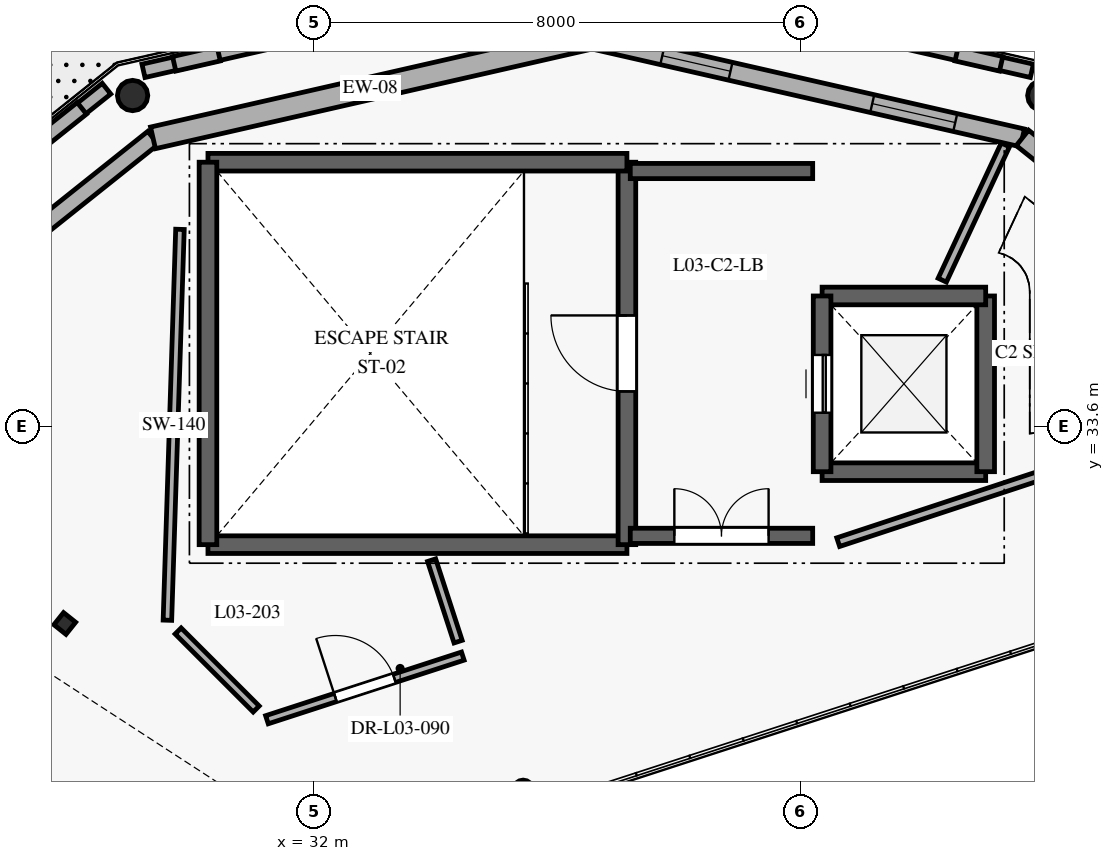
"""IFC4 building model, lengths in metres.
Left out: names, types, materials, properties, quantities, classifications, styles, units other than length and angle.
Written with IfcOpenShell. Run it as: python <this file> out.ifc"""

import sys

from ifc_helpers import new_model, si_unit, direction, frame, frame_2d, origin, origin_2d, place, context, subcontext, project, spatial, rectangle, circle, hollow_circle, i_section, extrude, element, fill, save


model = new_model("IFC4")
c1 = context("Model", 3, precision=1e-05, world=origin(), true_north=direction((0.0, 1.0)))
c2 = subcontext(c1, "Body", "Model", "MODEL_VIEW")
j1 = project(units=[si_unit("LENGTHUNIT", "METRE"), si_unit("PLANEANGLEUNIT", "RADIAN")], contexts=[c1])
p1 = place(None, origin())
s1 = spatial("IfcSite", under=j1, at=p1, CompositionType="ELEMENT")
p2 = place(p1, origin())
s2 = spatial("IfcBuilding", under=s1, at=p2, CompositionType="ELEMENT")
p3 = place(p2, frame((0.0, 0.0, 12.6)))
s3 = spatial("IfcBuildingStorey", under=s2, at=p3, CompositionType="ELEMENT", Elevation=12.6)
p4 = place(p3, frame((35.439, 27.621, 0.0), z_axis=(0.0, 0.0, 1.0), x_axis=(0.951056516295, 0.309016994375, 0.0)))
e1 = element("IfcColumn", 1, at=p4, inside=s3, PredefinedType="COLUMN", context=c2, shape_type="SweptSolid", body=[
    extrude(hollow_circle(Radius=0.162, WallThickness=0.016, at=origin_2d()), origin(), (0.0, 0.0, 1.0), 4.2),
])
for number, where, z_axis, x_axis in (
    (2, (43.985, 39.042, 0.0), (0.0, 0.0, 1.0), (-0.901, 0.434, 0.0)),
    (3, (29.015, 39.042, 0.0), (0.0, 0.0, 1.0), (-0.901, -0.434, 0.0)),
):
    element("IfcColumn", number, at=place(p3, frame(where, z_axis=z_axis, x_axis=x_axis)), inside=s3, PredefinedType="COLUMN", context=c2, shape_type="SweptSolid", body=[
        extrude(circle(Radius=0.25, at=origin_2d()), origin(), (0.0, 0.0, 1.0), 4.2),
    ])
p5 = place(p3, frame((27.9, 30.358, 0.0), z_axis=(0.0, 0.0, 1.0), x_axis=(-0.623470308046, -0.781847027868, 0.0)))
e4 = element("IfcColumn", 4, at=p5, inside=s3, PredefinedType="COLUMN", context=c2, shape_type="SweptSolid", body=[
    extrude(i_section(OverallWidth=0.255, OverallDepth=0.254, WebThickness=0.009, FlangeThickness=0.014, FilletRadius=0.013, at=origin_2d()), origin(), (0.0, 0.0, 1.0), 4.2),
])
p6 = place(p3, frame((23.618, 33.773, 0.0), z_axis=(0.0, 0.0, 1.0), x_axis=(0.781819636461, 0.623504655992, 0.0)))
e5 = element("IfcWall", 5, at=p6, inside=s3, PredefinedType="SOLIDWALL", context=c2, shape_type="SweptSolid", body=[
    extrude(rectangle(XDim=7.333, YDim=0.275, at=frame_2d((3.667, 0.0))), origin(), (0.0, 0.0, 1.0), 3.94),
])
p7 = place(p6, frame((0.35, 0.0, 0.85)))
e6 = element("IfcOpeningElement", 6, at=p7, cuts=e5, PredefinedType="OPENING", context=c2, shape_type="SweptSolid", body=[
    extrude(rectangle(XDim=0.85, YDim=1.4, at=frame_2d((0.425, 0.7))), frame((0.0, 0.147, 0.0), z_axis=(0.0, -1.0, 0.0), x_axis=(1.0, 0.0, 0.0)), (0.0, 0.0, 1.0), 0.295),
])
p8 = place(p6, frame((4.016, 0.0, 0.85)))
e7 = element("IfcOpeningElement", 7, at=p8, cuts=e5, PredefinedType="OPENING", context=c2, shape_type="SweptSolid", body=[
    extrude(rectangle(XDim=0.85, YDim=1.4, at=frame_2d((0.425, 0.7))), frame((0.0, 0.147, 0.0), z_axis=(0.0, -1.0, 0.0), x_axis=(1.0, 0.0, 0.0)), (0.0, 0.0, 1.0), 0.295),
])
p9 = place(p3, frame((29.351, 38.345, 0.0), z_axis=(0.0, 0.0, 1.0), x_axis=(0.974932633187, 0.222500248868, 0.0)))
e8 = element("IfcWall", 8, at=p9, inside=s3, PredefinedType="SOLIDWALL", context=c2, shape_type="SweptSolid", body=[
    extrude(rectangle(XDim=7.333, YDim=0.365, at=frame_2d((3.667, 0.0))), origin(), (0.0, 0.0, 1.0), 3.94),
])
p10 = place(p3, frame((36.5, 39.977, 0.0), z_axis=(0.0, 0.0, 1.0), x_axis=(0.974932633187, -0.222500248868, 0.0)))
e9 = element("IfcWall", 9, at=p10, inside=s3, PredefinedType="SOLIDWALL", context=c2, shape_type="SweptSolid", body=[
    extrude(rectangle(XDim=7.333, YDim=0.3, at=frame_2d((3.667, 0.0))), origin(), (0.0, 0.0, 1.0), 3.94),
])
p11 = place(p10, frame((1.258, 0.0, 0.85)))
e10 = element("IfcOpeningElement", 10, at=p11, cuts=e9, PredefinedType="OPENING", context=c2, shape_type="SweptSolid", body=[
    extrude(rectangle(XDim=1.15, YDim=1.5, at=frame_2d((0.575, 0.75))), frame((0.0, 0.16, 0.0), z_axis=(0.0, -1.0, 0.0), x_axis=(1.0, 0.0, 0.0)), (0.0, 0.0, 1.0), 0.32),
])
p12 = place(p10, frame((4.8, 0.0, 0.85)))
e11 = element("IfcOpeningElement", 11, at=p12, cuts=e9, PredefinedType="OPENING", context=c2, shape_type="SweptSolid", body=[
    extrude(rectangle(XDim=1.4, YDim=1.5, at=frame_2d((0.7, 0.75))), frame((0.0, 0.16, 0.0), z_axis=(0.0, -1.0, 0.0), x_axis=(1.0, 0.0, 0.0)), (0.0, 0.0, 1.0), 0.32),
])
p13 = place(p3, frame((43.649, 38.345, 0.0), z_axis=(0.0, 0.0, 1.0), x_axis=(0.781819636461, -0.623504655992, 0.0)))
e12 = element("IfcWall", 12, at=p13, inside=s3, PredefinedType="SOLIDWALL", context=c2, shape_type="SweptSolid", body=[
    extrude(rectangle(XDim=7.333, YDim=0.325, at=frame_2d((3.667, 0.0))), origin(), (0.0, 0.0, 1.0), 3.94),
])
p14 = place(p13, frame((1.008, 0.0, 0.85)))
e13 = element("IfcOpeningElement", 13, at=p14, cuts=e12, PredefinedType="OPENING", context=c2, shape_type="SweptSolid", body=[
    extrude(rectangle(XDim=1.65, YDim=1.5, at=frame_2d((0.825, 0.75))), frame((0.0, 0.172, 0.0), z_axis=(0.0, -1.0, 0.0), x_axis=(1.0, 0.0, 0.0)), (0.0, 0.0, 1.0), 0.345),
])
p15 = place(p13, frame((4.55, 0.0, 0.85)))
e14 = element("IfcOpeningElement", 14, at=p15, cuts=e12, PredefinedType="OPENING", context=c2, shape_type="SweptSolid", body=[
    extrude(rectangle(XDim=1.9, YDim=1.5, at=frame_2d((0.95, 0.75))), frame((0.0, 0.172, 0.0), z_axis=(0.0, -1.0, 0.0), x_axis=(1.0, 0.0, 0.0)), (0.0, 0.0, 1.0), 0.345),
])
p16 = place(p3, frame((43.805, 39.448, 0.0), z_axis=(0.0, 0.0, 1.0), x_axis=(-0.974925038555, 0.222533523763, 0.0)))
e15 = element("IfcWall", 15, at=p16, inside=s3, PredefinedType="ELEMENTEDWALL", context=c2, shape_type="SweptSolid", body=[
    extrude(rectangle(XDim=7.146, YDim=0.225, at=frame_2d((3.573, 0.0))), origin(), (0.0, 0.0, 1.0), 1.09),
])
p17 = place(p3, frame((43.3, 39.563, 1.09), z_axis=(0.0, 0.0, 1.0), x_axis=(-0.974898895053, 0.222648028119, 0.0)))
e16 = element("IfcWall", 16, at=p17, inside=s3, PredefinedType="ELEMENTEDWALL", context=c2, shape_type="SweptSolid", body=[
    extrude(rectangle(XDim=0.75, YDim=0.245, at=frame_2d((0.375, 0.0))), origin(), (0.0, 0.0, 1.0), 2.85),
])
p18 = place(p3, frame((36.162, 41.038, 0.0), z_axis=(0.0, 0.0, 1.0), x_axis=(-0.97493180424, -0.222503881046, 0.0)))
e17 = element("IfcWall", 17, at=p18, inside=s3, PredefinedType="ELEMENTEDWALL", context=c2, shape_type="SweptSolid", body=[
    extrude(rectangle(XDim=7.147, YDim=0.225, at=frame_2d((3.574, 0.0))), origin(), (0.0, 0.0, 1.0), 1.09),
])
p19 = place(p3, frame((30.431, 39.73, 1.09), z_axis=(0.0, 0.0, 1.0), x_axis=(-0.974969505796, -0.222338621856, 0.0)))
e18 = element("IfcWall", 18, at=p19, inside=s3, PredefinedType="ELEMENTEDWALL", context=c2, shape_type="SweptSolid", body=[
    extrude(rectangle(XDim=0.75, YDim=0.245, at=frame_2d((0.375, 0.0))), origin(), (0.0, 0.0, 1.0), 2.85),
])
p20 = place(p3, frame((28.586, 39.155, 0.0), z_axis=(0.0, 0.0, 1.0), x_axis=(-0.781840989125, -0.623477880702, 0.0)))
e19 = element("IfcWall", 19, at=p20, inside=s3, PredefinedType="ELEMENTEDWALL", context=c2, shape_type="SweptSolid", body=[
    extrude(rectangle(XDim=7.147, YDim=0.225, at=frame_2d((3.573, 0.0))), origin(), (0.0, 0.0, 1.0), 1.09),
])
p21 = place(p3, frame((28.181, 38.832, 1.09), z_axis=(0.0, 0.0, 1.0), x_axis=(-0.781757082545, -0.623583084994, 0.0)))
e20 = element("IfcWall", 20, at=p21, inside=s3, PredefinedType="ELEMENTEDWALL", context=c2, shape_type="SweptSolid", body=[
    extrude(rectangle(XDim=0.75, YDim=0.245, at=frame_2d((0.375, 0.0))), origin(), (0.0, 0.0, 1.0), 2.85),
])
p22 = place(p3, frame((30.255, 31.655, 0.0), z_axis=(0.0, 0.0, 1.0), x_axis=(1.0, 0.0, 0.0)))
e21 = element("IfcWall", 21, at=p22, inside=s3, PredefinedType="SHEAR", context=c2, shape_type="SweptSolid", body=[
    extrude(rectangle(XDim=6.89, YDim=0.29, at=frame_2d((3.445, 0.0))), origin(), (0.0, 0.0, 1.0), 3.95),
])
p23 = place(p3, frame((37.145, 31.655, 0.0), z_axis=(0.0, 0.0, 1.0), x_axis=(0.0, 1.0, 0.0)))
e22 = element("IfcWall", 22, at=p23, inside=s3, PredefinedType="SHEAR", context=c2, shape_type="SweptSolid", body=[
    extrude(rectangle(XDim=6.29, YDim=0.29, at=frame_2d((3.145, 0.0))), origin(), (0.0, 0.0, 1.0), 3.95),
])
p24 = place(p23, frame((2.52, 0.0, 0.0)))
e23 = element("IfcOpeningElement", 23, at=p24, cuts=e22, PredefinedType="OPENING", context=c2, shape_type="SweptSolid", body=[
    extrude(rectangle(XDim=1.25, YDim=2.1, at=frame_2d((0.625, 1.05))), frame((0.0, 0.155, 0.0), z_axis=(0.0, -1.0, 0.0), x_axis=(1.0, 0.0, 0.0)), (0.0, 0.0, 1.0), 0.31),
])
p25 = place(p3, frame((37.145, 37.945, 0.0), z_axis=(0.0, 0.0, 1.0), x_axis=(-1.0, 0.0, 0.0)))
e24 = element("IfcWall", 24, at=p25, inside=s3, PredefinedType="SHEAR", context=c2, shape_type="SweptSolid", body=[
    extrude(rectangle(XDim=6.89, YDim=0.29, at=frame_2d((3.445, 0.0))), origin(), (0.0, 0.0, 1.0), 3.95),
])
p26 = place(p3, frame((30.255, 37.945, 0.0), z_axis=(0.0, 0.0, 1.0), x_axis=(0.0, -1.0, 0.0)))
e25 = element("IfcWall", 25, at=p26, inside=s3, PredefinedType="SHEAR", context=c2, shape_type="SweptSolid", body=[
    extrude(rectangle(XDim=6.29, YDim=0.29, at=frame_2d((3.145, 0.0))), origin(), (0.0, 0.0, 1.0), 3.95),
])
p27 = place(p3, frame((40.355, 32.855, 0.0), z_axis=(0.0, 0.0, 1.0), x_axis=(1.0, 0.0, 0.0)))
e26 = element("IfcWall", 26, at=p27, inside=s3, PredefinedType="SHEAR", context=c2, shape_type="SweptSolid", body=[
    extrude(rectangle(XDim=2.69, YDim=0.29, at=frame_2d((1.345, 0.0))), origin(), (0.0, 0.0, 1.0), 3.95),
])
p28 = place(p3, frame((43.045, 32.855, 0.0), z_axis=(0.0, 0.0, 1.0), x_axis=(0.0, 1.0, 0.0)))
e27 = element("IfcWall", 27, at=p28, inside=s3, PredefinedType="SHEAR", context=c2, shape_type="SweptSolid", body=[
    extrude(rectangle(XDim=2.89, YDim=0.29, at=frame_2d((1.445, 0.0))), origin(), (0.0, 0.0, 1.0), 3.95),
])
p29 = place(p3, frame((43.045, 35.745, 0.0), z_axis=(0.0, 0.0, 1.0), x_axis=(-1.0, 0.0, 0.0)))
e28 = element("IfcWall", 28, at=p29, inside=s3, PredefinedType="SHEAR", context=c2, shape_type="SweptSolid", body=[
    extrude(rectangle(XDim=2.69, YDim=0.29, at=frame_2d((1.345, 0.0))), origin(), (0.0, 0.0, 1.0), 3.95),
])
p30 = place(p3, frame((40.355, 35.745, 0.0), z_axis=(0.0, 0.0, 1.0), x_axis=(0.0, -1.0, 0.0)))
e29 = element("IfcWall", 29, at=p30, inside=s3, PredefinedType="SHEAR", context=c2, shape_type="SweptSolid", body=[
    extrude(rectangle(XDim=2.89, YDim=0.29, at=frame_2d((1.445, 0.0))), origin(), (0.0, 0.0, 1.0), 3.95),
])
p31 = place(p30, frame((0.97, 0.0, 0.0)))
e30 = element("IfcOpeningElement", 30, at=p31, cuts=e29, PredefinedType="OPENING", context=c2, shape_type="SweptSolid", body=[
    extrude(rectangle(XDim=0.95, YDim=2.1, at=frame_2d((0.475, 1.05))), frame((0.0, 0.155, 0.0), z_axis=(0.0, -1.0, 0.0), x_axis=(1.0, 0.0, 0.0)), (0.0, 0.0, 1.0), 0.31),
])
p32 = place(p3, frame((37.2, 31.8, 0.0), z_axis=(0.0, 0.0, 1.0), x_axis=(1.0, 0.0, 0.0)))
e31 = element("IfcWall", 31, at=p32, inside=s3, PredefinedType="SHEAR", context=c2, shape_type="SweptSolid", body=[
    extrude(rectangle(XDim=3.0, YDim=0.25, at=frame_2d((1.5, 0.0))), origin(), (0.0, 0.0, 1.0), 3.95),
])
p33 = place(p32, frame((0.725, 0.0, 0.0)))
e32 = element("IfcOpeningElement", 32, at=p33, cuts=e31, PredefinedType="OPENING", context=c2, shape_type="SweptSolid", body=[
    extrude(rectangle(XDim=1.55, YDim=2.15, at=frame_2d((0.775, 1.075))), frame((0.0, 0.135, 0.0), z_axis=(0.0, -1.0, 0.0), x_axis=(1.0, 0.0, 0.0)), (0.0, 0.0, 1.0), 0.27),
])
p34 = place(p3, frame((40.2, 37.8, 0.0), z_axis=(0.0, 0.0, 1.0), x_axis=(-1.0, 0.0, 0.0)))
e33 = element("IfcWall", 33, at=p34, inside=s3, PredefinedType="SHEAR", context=c2, shape_type="SweptSolid", body=[
    extrude(rectangle(XDim=3.0, YDim=0.25, at=frame_2d((1.5, 0.0))), origin(), (0.0, 0.0, 1.0), 3.95),
])
p35 = place(p3, frame((43.369, 38.23, 0.0), z_axis=(0.0, 0.0, 1.0), x_axis=(-0.42258054556, -0.906325373425, 0.0)))
e34 = element("IfcWall", 34, at=p35, inside=s3, PredefinedType="PARTITIONING", context=c2, shape_type="SweptSolid", body=[
    extrude(rectangle(XDim=2.455, YDim=0.15, at=frame_2d((1.228, 0.0))), origin(), (0.0, 0.0, 1.0), 3.95),
])
p36 = place(p3, frame((40.62, 31.696, 0.0), z_axis=(0.0, 0.0, 1.0), x_axis=(0.949660752523, 0.313280154363, 0.0)))
e35 = element("IfcWall", 35, at=p36, inside=s3, PredefinedType="PARTITIONING", context=c2, shape_type="SweptSolid", body=[
    extrude(rectangle(XDim=3.779, YDim=0.15, at=frame_2d((1.889, 0.0))), origin(), (0.0, 0.0, 1.0), 3.95),
])
p37 = place(p3, frame((31.225, 28.775, 0.0), z_axis=(0.0, 0.0, 1.0), x_axis=(0.951056314451, 0.309017615587, 0.0)))
e36 = element("IfcWall", 36, at=p37, inside=s3, PredefinedType="PLUMBINGWALL", context=c2, shape_type="SweptSolid", body=[
    extrude(rectangle(XDim=3.387, YDim=0.14, at=frame_2d((1.693, 0.0))), origin(), (0.0, 0.0, 1.0), 3.95),
])
p38 = place(p37, frame((1.184, 0.0, 0.0)))
e37 = element("IfcOpeningElement", 37, at=p38, cuts=e36, PredefinedType="OPENING", context=c2, shape_type="SweptSolid", body=[
    extrude(rectangle(XDim=1.02, YDim=2.06, at=frame_2d((0.51, 1.03))), frame((0.0, 0.08, 0.0), z_axis=(0.0, -1.0, 0.0), x_axis=(1.0, 0.0, 0.0)), (0.0, 0.0, 1.0), 0.16),
])
p39 = place(p3, frame((34.369, 30.06, 0.0), z_axis=(0.0, 0.0, 1.0), x_axis=(-0.30909782547, 0.951030248883, 0.0)))
e38 = element("IfcWall", 38, at=p39, inside=s3, PredefinedType="PLUMBINGWALL", context=c2, shape_type="SweptSolid", body=[
    extrude(rectangle(XDim=1.409, YDim=0.14, at=frame_2d((0.705, 0.0))), origin(), (0.0, 0.0, 1.0), 3.95),
])
p40 = place(p3, frame((29.794, 36.841, 0.0), z_axis=(0.0, 0.0, 1.0), x_axis=(-0.03211164013, -0.999484288305, 0.0)))
e39 = element("IfcWall", 39, at=p40, inside=s3, PredefinedType="PLUMBINGWALL", context=c2, shape_type="SweptSolid", body=[
    extrude(rectangle(XDim=6.432, YDim=0.14, at=frame_2d((3.216, 0.0))), origin(), (0.0, 0.0, 1.0), 3.95),
])
p41 = place(p3, frame((29.764, 30.236, 0.0), z_axis=(0.0, 0.0, 1.0), x_axis=(0.707106781187, -0.707106781187, 0.0)))
e40 = element("IfcWall", 40, at=p41, inside=s3, PredefinedType="PLUMBINGWALL", context=c2, shape_type="SweptSolid", body=[
    extrude(rectangle(XDim=1.815, YDim=0.14, at=frame_2d((0.908, 0.0))), origin(), (0.0, 0.0, 1.0), 3.95),
])
p42 = place(p11, origin())
e41 = element("IfcWindow", 41, at=p42, inside=s3, PartitioningType="SINGLE_PANEL", PredefinedType="WINDOW", context=c2, shape_type="SweptSolid", body=[
    extrude(rectangle(XDim=1.15, YDim=1.5, at=frame_2d((0.575, 0.75))), frame((0.0, 0.03, 0.0), z_axis=(0.0, -1.0, 0.0), x_axis=(1.0, 0.0, 0.0)), (0.0, 0.0, 1.0), 0.06),
])
fill(e10, e41)
p43 = place(p12, origin())
e42 = element("IfcWindow", 42, at=p43, inside=s3, PartitioningType="SINGLE_PANEL", PredefinedType="WINDOW", context=c2, shape_type="SweptSolid", body=[
    extrude(rectangle(XDim=1.4, YDim=1.5, at=frame_2d((0.7, 0.75))), frame((0.0, 0.03, 0.0), z_axis=(0.0, -1.0, 0.0), x_axis=(1.0, 0.0, 0.0)), (0.0, 0.0, 1.0), 0.06),
])
fill(e11, e42)
p44 = place(p24, origin())
e43 = element("IfcDoor", 43, at=p44, inside=s3, OperationType="SINGLE_SWING_RIGHT", PredefinedType="DOOR", context=c2, shape_type="SweptSolid", body=[
    extrude(rectangle(XDim=1.25, YDim=2.1, at=frame_2d((0.625, 1.05))), frame((0.0, 0.025, 0.0), z_axis=(0.0, -1.0, 0.0), x_axis=(1.0, 0.0, 0.0)), (0.0, 0.0, 1.0), 0.05),
])
fill(e23, e43)
p45 = place(p31, frame((0.95, 0.0, 0.0), z_axis=(0.0, 0.0, 1.0), x_axis=(-1.0, 0.0, 0.0)))
e44 = element("IfcDoor", 44, at=p45, inside=s3, OperationType="SLIDING_TO_LEFT", PredefinedType="DOOR", context=c2, shape_type="SweptSolid", body=[
    extrude(rectangle(XDim=0.95, YDim=2.1, at=frame_2d((0.475, 1.05))), frame((0.0, 0.025, 0.0), z_axis=(0.0, -1.0, 0.0), x_axis=(1.0, 0.0, 0.0)), (0.0, 0.0, 1.0), 0.05),
])
fill(e30, e44)
p46 = place(p33, origin())
e45 = element("IfcDoor", 45, at=p46, inside=s3, OperationType="DOUBLE_DOOR_SINGLE_SWING", PredefinedType="DOOR", context=c2, shape_type="SweptSolid", body=[
    extrude(rectangle(XDim=1.55, YDim=2.15, at=frame_2d((0.775, 1.075))), frame((0.0, 0.025, 0.0), z_axis=(0.0, -1.0, 0.0), x_axis=(1.0, 0.0, 0.0)), (0.0, 0.0, 1.0), 0.05),
])
fill(e32, e45)
p47 = place(p38, frame((1.02, 0.0, 0.0), z_axis=(0.0, 0.0, 1.0), x_axis=(-1.0, 0.0, 0.0)))
e46 = element("IfcDoor", 46, at=p47, inside=s3, OperationType="SINGLE_SWING_LEFT", PredefinedType="DOOR", context=c2, shape_type="SweptSolid", body=[
    extrude(rectangle(XDim=1.02, YDim=2.06, at=frame_2d((0.51, 1.03))), frame((0.0, 0.025, 0.0), z_axis=(0.0, -1.0, 0.0), x_axis=(1.0, 0.0, 0.0)), (0.0, 0.0, 1.0), 0.05),
])
fill(e37, e46)
save(model, sys.argv[1])
